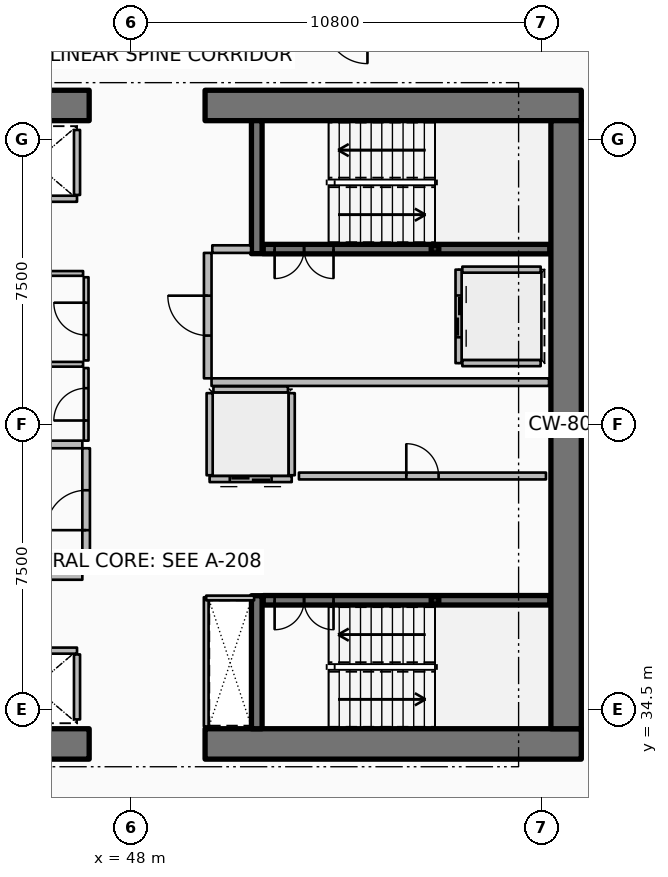
"""IFC4 building model, lengths in metres.
Left out: names, types, materials, properties, quantities, classifications, styles, units other than length and angle.
Written with IfcOpenShell. Run it as: python <this file> out.ifc"""

import sys

from ifc_helpers import new_model, si_unit, direction, frame, frame_2d, origin, origin_2d, place, context, subcontext, project, spatial, rectangle, hollow_rectangle, extrude, element, fill, save


model = new_model("IFC4")
c1 = context("Model", 3, precision=1e-05, world=origin(), true_north=direction((0.0, 1.0)))
c2 = subcontext(c1, "Body", "Model", "MODEL_VIEW")
j1 = project(units=[si_unit("LENGTHUNIT", "METRE"), si_unit("PLANEANGLEUNIT", "RADIAN")], contexts=[c1])
p1 = place(None, origin())
s1 = spatial("IfcSite", under=j1, at=p1, CompositionType="ELEMENT")
p2 = place(p1, origin())
s2 = spatial("IfcBuilding", under=s1, at=p2, CompositionType="ELEMENT")
p3 = place(p2, frame((0.0, 0.0, 169.05)))
s3 = spatial("IfcBuildingStorey", under=s2, at=p3, CompositionType="ELEMENT", Elevation=169.05)
p4 = place(p3, frame((37.0, 33.6, 0.0), z_axis=(0.0, 0.0, 1.0), x_axis=(1.0, 0.0, 0.0)))
e1 = element("IfcWall", 1, at=p4, inside=s3, PredefinedType="SHEAR", context=c2, shape_type="SweptSolid", body=[
    extrude(rectangle(XDim=9.9, YDim=0.8, at=frame_2d((4.95, 0.0))), origin(), (0.0, 0.0, 1.0), 3.75),
])
p5 = place(p3, frame((49.95, 33.6, 0.0), z_axis=(0.0, 0.0, 1.0), x_axis=(1.0, 0.0, 0.0)))
e2 = element("IfcWall", 2, at=p5, inside=s3, PredefinedType="SHEAR", context=c2, shape_type="SweptSolid", body=[
    extrude(rectangle(XDim=9.9, YDim=0.8, at=frame_2d((4.95, 0.0))), origin(), (0.0, 0.0, 1.0), 3.75),
])
p6 = place(p3, frame((37.0, 50.4, 0.0), z_axis=(0.0, 0.0, 1.0), x_axis=(1.0, 0.0, 0.0)))
e3 = element("IfcWall", 3, at=p6, inside=s3, PredefinedType="SHEAR", context=c2, shape_type="SweptSolid", body=[
    extrude(rectangle(XDim=9.9, YDim=0.8, at=frame_2d((4.95, 0.0))), origin(), (0.0, 0.0, 1.0), 3.75),
])
p7 = place(p3, frame((49.95, 50.4, 0.0), z_axis=(0.0, 0.0, 1.0), x_axis=(1.0, 0.0, 0.0)))
e4 = element("IfcWall", 4, at=p7, inside=s3, PredefinedType="SHEAR", context=c2, shape_type="SweptSolid", body=[
    extrude(rectangle(XDim=9.9, YDim=0.8, at=frame_2d((4.95, 0.0))), origin(), (0.0, 0.0, 1.0), 3.75),
])
p8 = place(p3, frame((59.45, 34.0, 0.0), z_axis=(0.0, 0.0, 1.0), x_axis=(0.0, 1.0, 0.0)))
e5 = element("IfcWall", 5, at=p8, inside=s3, PredefinedType="SHEAR", context=c2, shape_type="SweptSolid", body=[
    extrude(rectangle(XDim=16.0, YDim=0.8, at=frame_2d((8.0, 0.0))), origin(), (0.0, 0.0, 1.0), 3.75),
])
for number, where, z_axis, x_axis in (
    (6, (51.31, 46.5, 0.0), (0.0, 0.0, 1.0), (0.0, 1.0, 0.0)),
    (7, (51.31, 34.0, 0.0), (0.0, 0.0, 1.0), (0.0, 1.0, 0.0)),
):
    element("IfcWall", number, at=place(p3, frame(where, z_axis=z_axis, x_axis=x_axis)), inside=s3, PredefinedType="SHEAR", context=c2, shape_type="SweptSolid", body=[
        extrude(rectangle(XDim=3.5, YDim=0.28, at=frame_2d((1.75, 0.0))), origin(), (0.0, 0.0, 1.0), 3.75),
    ])
for number, where, z_axis, x_axis in (
    (8, (56.0, 46.62, 0.0), (0.0, 0.0, 1.0), (1.0, 0.0, 0.0)),
    (9, (56.0, 37.38, 0.0), (0.0, 0.0, 1.0), (1.0, 0.0, 0.0)),
):
    element("IfcColumn", number, at=place(p3, frame(where, z_axis=z_axis, x_axis=x_axis)), inside=s3, PredefinedType="COLUMN", context=c2, shape_type="SweptSolid", body=[
        extrude(hollow_rectangle(XDim=0.2, YDim=0.2, WallThickness=0.01, InnerFilletRadius=0.01, OuterFilletRadius=0.02, at=origin_2d()), origin(), (0.0, 0.0, 1.0), 1.67),
    ])
p9 = place(p3, frame((51.48, 46.62, 0.0), z_axis=(0.0, 0.0, 1.0), x_axis=(1.0, 0.0, 0.0)))
e10 = element("IfcWall", 10, at=p9, inside=s3, PredefinedType="SOLIDWALL", context=c2, shape_type="SweptSolid", body=[
    extrude(rectangle(XDim=7.54, YDim=0.25, at=frame_2d((3.77, 0.0))), origin(), (0.0, 0.0, 1.0), 3.5),
])
p10 = place(p9, frame((0.3, 0.0, 0.0)))
e11 = element("IfcOpeningElement", 11, at=p10, cuts=e10, PredefinedType="OPENING", context=c2, shape_type="SweptSolid", body=[
    extrude(rectangle(XDim=1.55, YDim=2.15, at=frame_2d((0.775, 1.075))), frame((0.0, 0.135, 0.0), z_axis=(0.0, -1.0, 0.0), x_axis=(1.0, 0.0, 0.0)), (0.0, 0.0, 1.0), 0.27),
])
p11 = place(p3, frame((51.48, 37.38, 0.0), z_axis=(0.0, 0.0, 1.0), x_axis=(1.0, 0.0, 0.0)))
e12 = element("IfcWall", 12, at=p11, inside=s3, PredefinedType="SOLIDWALL", context=c2, shape_type="SweptSolid", body=[
    extrude(rectangle(XDim=7.54, YDim=0.25, at=frame_2d((3.77, 0.0))), origin(), (0.0, 0.0, 1.0), 3.5),
])
p12 = place(p11, frame((0.3, 0.0, 0.0)))
e13 = element("IfcOpeningElement", 13, at=p12, cuts=e12, PredefinedType="OPENING", context=c2, shape_type="SweptSolid", body=[
    extrude(rectangle(XDim=1.55, YDim=2.15, at=frame_2d((0.775, 1.075))), frame((0.0, 0.135, 0.0), z_axis=(0.0, -1.0, 0.0), x_axis=(1.0, 0.0, 0.0)), (0.0, 0.0, 1.0), 0.27),
])
p13 = place(p3, frame((46.58, 47.945, 0.0), z_axis=(0.0, 0.0, 1.0), x_axis=(-1.0, 0.0, 0.0)))
e14 = element("IfcWall", 14, at=p13, inside=s3, PredefinedType="PARTITIONING", context=c2, shape_type="SweptSolid", body=[
    extrude(rectangle(XDim=2.26, YDim=0.16, at=frame_2d((1.13, 0.0))), origin(), (0.0, 0.0, 1.0), 3.5),
])
p14 = place(p3, frame((46.58, 48.045, 0.0), z_axis=(0.0, 0.0, 1.0), x_axis=(0.0, 1.0, 0.0)))
e15 = element("IfcWall", 15, at=p14, inside=s3, PredefinedType="PARTITIONING", context=c2, shape_type="SweptSolid", body=[
    extrude(rectangle(XDim=1.71, YDim=0.16, at=frame_2d((0.855, 0.0))), origin(), (0.0, 0.0, 1.0), 3.5),
])
p15 = place(p3, frame((44.32, 36.055, 0.0), z_axis=(0.0, 0.0, 1.0), x_axis=(1.0, 0.0, 0.0)))
e16 = element("IfcWall", 16, at=p15, inside=s3, PredefinedType="PARTITIONING", context=c2, shape_type="SweptSolid", body=[
    extrude(rectangle(XDim=2.26, YDim=0.16, at=frame_2d((1.13, 0.0))), origin(), (0.0, 0.0, 1.0), 3.5),
])
p16 = place(p3, frame((46.58, 34.245, 0.0), z_axis=(0.0, 0.0, 1.0), x_axis=(0.0, 1.0, 0.0)))
e17 = element("IfcWall", 17, at=p16, inside=s3, PredefinedType="PARTITIONING", context=c2, shape_type="SweptSolid", body=[
    extrude(rectangle(XDim=1.71, YDim=0.16, at=frame_2d((0.855, 0.0))), origin(), (0.0, 0.0, 1.0), 3.5),
])
p17 = place(p3, frame((56.62, 46.08, 0.0), z_axis=(0.0, 0.0, 1.0), x_axis=(0.0, -1.0, 0.0)))
e18 = element("IfcWall", 18, at=p17, inside=s3, PredefinedType="PARTITIONING", context=c2, shape_type="SweptSolid", body=[
    extrude(rectangle(XDim=2.46, YDim=0.16, at=frame_2d((1.23, 0.0))), origin(), (0.0, 0.0, 1.0), 3.5),
])
p18 = place(p17, frame((0.68, 0.0, 0.0)))
e19 = element("IfcOpeningElement", 19, at=p18, cuts=e18, PredefinedType="OPENING", context=c2, shape_type="SweptSolid", body=[
    extrude(rectangle(XDim=1.1, YDim=2.1, at=frame_2d((0.55, 1.05))), frame((0.0, 0.09, 0.0), z_axis=(0.0, -1.0, 0.0), x_axis=(1.0, 0.0, 0.0)), (0.0, 0.0, 1.0), 0.18),
])
for number, where, z_axis, x_axis in (
    (20, (56.72, 46.08, 0.0), (0.0, 0.0, 1.0), (1.0, 0.0, 0.0)),
    (21, (56.72, 43.62, 0.0), (0.0, 0.0, 1.0), (1.0, 0.0, 0.0)),
):
    element("IfcWall", number, at=place(p3, frame(where, z_axis=z_axis, x_axis=x_axis)), inside=s3, PredefinedType="PARTITIONING", context=c2, shape_type="SweptSolid", body=[
        extrude(rectangle(XDim=2.06, YDim=0.16, at=frame_2d((1.03, 0.0))), origin(), (0.0, 0.0, 1.0), 3.5),
    ])
p19 = place(p3, frame((52.23, 40.57, 0.0), z_axis=(0.0, 0.0, 1.0), x_axis=(-1.0, 0.0, 0.0)))
e22 = element("IfcWall", 22, at=p19, inside=s3, PredefinedType="PARTITIONING", context=c2, shape_type="SweptSolid", body=[
    extrude(rectangle(XDim=2.16, YDim=0.16, at=frame_2d((1.08, 0.0))), origin(), (0.0, 0.0, 1.0), 3.5),
])
p20 = place(p19, frame((0.53, 0.0, 0.0)))
e23 = element("IfcOpeningElement", 23, at=p20, cuts=e22, PredefinedType="OPENING", context=c2, shape_type="SweptSolid", body=[
    extrude(rectangle(XDim=1.1, YDim=2.1, at=frame_2d((0.55, 1.05))), frame((0.0, 0.09, 0.0), z_axis=(0.0, -1.0, 0.0), x_axis=(1.0, 0.0, 0.0)), (0.0, 0.0, 1.0), 0.18),
])
for number, where, z_axis, x_axis in (
    (24, (52.23, 40.67, 0.0), (0.0, 0.0, 1.0), (0.0, 1.0, 0.0)),
    (25, (50.07, 40.67, 0.0), (0.0, 0.0, 1.0), (0.0, 1.0, 0.0)),
):
    element("IfcWall", number, at=place(p3, frame(where, z_axis=z_axis, x_axis=x_axis)), inside=s3, PredefinedType="PARTITIONING", context=c2, shape_type="SweptSolid", body=[
        extrude(rectangle(XDim=2.16, YDim=0.16, at=frame_2d((1.08, 0.0))), origin(), (0.0, 0.0, 1.0), 3.5),
    ])
p21 = place(p3, frame((50.17, 42.93, 0.0), z_axis=(0.0, 0.0, 1.0), x_axis=(1.0, 0.0, 0.0)))
e26 = element("IfcWall", 26, at=p21, inside=s3, PredefinedType="PARTITIONING", context=c2, shape_type="SweptSolid", body=[
    extrude(rectangle(XDim=1.96, YDim=0.16, at=frame_2d((0.98, 0.0))), origin(), (0.0, 0.0, 1.0), 3.5),
])
p22 = place(p3, frame((52.42, 40.65, 0.0), z_axis=(0.0, 0.0, 1.0), x_axis=(1.0, 0.0, 0.0)))
e27 = element("IfcWall", 27, at=p22, inside=s3, PredefinedType="PARTITIONING", context=c2, shape_type="SweptSolid", body=[
    extrude(rectangle(XDim=6.5, YDim=0.18, at=frame_2d((3.25, 0.0))), origin(), (0.0, 0.0, 1.0), 3.5),
])
p23 = place(p22, frame((2.825, 0.0, 0.0)))
e28 = element("IfcOpeningElement", 28, at=p23, cuts=e27, PredefinedType="OPENING", context=c2, shape_type="SweptSolid", body=[
    extrude(rectangle(XDim=0.85, YDim=2.06, at=frame_2d((0.425, 1.03))), frame((0.0, 0.1, 0.0), z_axis=(0.0, -1.0, 0.0), x_axis=(1.0, 0.0, 0.0)), (0.0, 0.0, 1.0), 0.2),
])
p24 = place(p3, frame((41.35, 38.02, 0.0), z_axis=(0.0, 0.0, 1.0), x_axis=(1.0, 0.0, 0.0)))
e29 = element("IfcWall", 29, at=p24, inside=s3, PredefinedType="PARTITIONING", context=c2, shape_type="SweptSolid", body=[
    extrude(rectangle(XDim=5.37, YDim=0.2, at=frame_2d((2.685, 0.0))), origin(), (0.0, 0.0, 1.0), 3.5),
])
p25 = place(p3, frame((43.92, 41.48, 0.0), z_axis=(0.0, 0.0, 1.0), x_axis=(1.0, 0.0, 0.0)))
e30 = element("IfcWall", 30, at=p25, inside=s3, PredefinedType="PARTITIONING", context=c2, shape_type="SweptSolid", body=[
    extrude(rectangle(XDim=2.8, YDim=0.2, at=frame_2d((1.4, 0.0))), origin(), (0.0, 0.0, 1.0), 3.5),
])
p26 = place(p3, frame((46.82, 38.12, 0.0), z_axis=(0.0, 0.0, 1.0), x_axis=(0.0, 1.0, 0.0)))
e31 = element("IfcWall", 31, at=p26, inside=s3, PredefinedType="PARTITIONING", context=c2, shape_type="SweptSolid", body=[
    extrude(rectangle(XDim=3.26, YDim=0.2, at=frame_2d((1.63, 0.0))), origin(), (0.0, 0.0, 1.0), 3.5),
])
p27 = place(p26, frame((1.105, 0.0, 0.0)))
e32 = element("IfcOpeningElement", 32, at=p27, cuts=e31, PredefinedType="OPENING", context=c2, shape_type="SweptSolid", body=[
    extrude(rectangle(XDim=1.05, YDim=2.1, at=frame_2d((0.525, 1.05))), frame((0.0, 0.11, 0.0), z_axis=(0.0, -1.0, 0.0), x_axis=(1.0, 0.0, 0.0)), (0.0, 0.0, 1.0), 0.22),
])
p28 = place(p3, frame((50.12, 43.12, 0.0), z_axis=(0.0, 0.0, 1.0), x_axis=(1.0, 0.0, 0.0)))
e33 = element("IfcWall", 33, at=p28, inside=s3, PredefinedType="PARTITIONING", context=c2, shape_type="SweptSolid", body=[
    extrude(rectangle(XDim=8.88, YDim=0.2, at=frame_2d((4.44, 0.0))), origin(), (0.0, 0.0, 1.0), 3.5),
])
p29 = place(p3, frame((50.14, 46.62, 0.0), z_axis=(0.0, 0.0, 1.0), x_axis=(1.0, 0.0, 0.0)))
e34 = element("IfcWall", 34, at=p29, inside=s3, PredefinedType="PARTITIONING", context=c2, shape_type="SweptSolid", body=[
    extrude(rectangle(XDim=1.02, YDim=0.2, at=frame_2d((0.51, 0.0))), origin(), (0.0, 0.0, 1.0), 3.5),
])
p30 = place(p3, frame((50.02, 43.22, 0.0), z_axis=(0.0, 0.0, 1.0), x_axis=(0.0, 1.0, 0.0)))
e35 = element("IfcWall", 35, at=p30, inside=s3, PredefinedType="PARTITIONING", context=c2, shape_type="SweptSolid", body=[
    extrude(rectangle(XDim=3.3, YDim=0.2, at=frame_2d((1.65, 0.0))), origin(), (0.0, 0.0, 1.0), 3.5),
])
p31 = place(p30, frame((1.125, 0.0, 0.0)))
e36 = element("IfcOpeningElement", 36, at=p31, cuts=e35, PredefinedType="OPENING", context=c2, shape_type="SweptSolid", body=[
    extrude(rectangle(XDim=1.05, YDim=2.1, at=frame_2d((0.525, 1.05))), frame((0.0, 0.11, 0.0), z_axis=(0.0, -1.0, 0.0), x_axis=(1.0, 0.0, 0.0)), (0.0, 0.0, 1.0), 0.22),
])
p32 = place(p3, frame((49.98, 34.06, 0.0), z_axis=(0.0, 0.0, 1.0), x_axis=(0.0, 1.0, 0.0)))
e37 = element("IfcWall", 37, at=p32, inside=s3, PredefinedType="PARTITIONING", context=c2, shape_type="SweptSolid", body=[
    extrude(rectangle(XDim=3.4, YDim=0.125, at=frame_2d((1.7, 0.0))), origin(), (0.0, 0.0, 1.0), 2.94),
])
p33 = place(p3, frame((49.98, 37.44, 0.0), z_axis=(0.0, 0.0, 1.0), x_axis=(1.0, 0.0, 0.0)))
e38 = element("IfcWall", 38, at=p33, inside=s3, PredefinedType="PARTITIONING", context=c2, shape_type="SweptSolid", body=[
    extrude(rectangle(XDim=1.26, YDim=0.125, at=frame_2d((0.63, 0.0))), origin(), (0.0, 0.0, 1.0), 2.94),
])
p34 = place(p3, frame((44.03, 43.59, 0.0), z_axis=(0.0, 0.0, 1.0), x_axis=(1.0, 0.0, 0.0)))
e39 = element("IfcWall", 39, at=p34, inside=s3, PredefinedType="PARTITIONING", context=c2, shape_type="SweptSolid", body=[
    extrude(rectangle(XDim=2.71, YDim=0.125, at=frame_2d((1.355, 0.0))), origin(), (0.0, 0.0, 1.0), 2.94),
])
p35 = place(p3, frame((46.82, 41.58, 0.0), z_axis=(0.0, 0.0, 1.0), x_axis=(0.0, 1.0, 0.0)))
e40 = element("IfcWall", 40, at=p35, inside=s3, PredefinedType="PARTITIONING", context=c2, shape_type="SweptSolid", body=[
    extrude(rectangle(XDim=1.91, YDim=0.125, at=frame_2d((0.955, 0.0))), origin(), (0.0, 0.0, 1.0), 2.94),
])
p36 = place(p35, frame((0.53, 0.0, 0.0)))
e41 = element("IfcOpeningElement", 41, at=p36, cuts=e40, PredefinedType="OPENING", context=c2, shape_type="SweptSolid", body=[
    extrude(rectangle(XDim=0.85, YDim=2.06, at=frame_2d((0.425, 1.03))), frame((0.0, 0.073, 0.0), z_axis=(0.0, -1.0, 0.0), x_axis=(1.0, 0.0, 0.0)), (0.0, 0.0, 1.0), 0.145),
])
p37 = place(p3, frame((46.82, 43.69, 0.0), z_axis=(0.0, 0.0, 1.0), x_axis=(0.0, 1.0, 0.0)))
e42 = element("IfcWall", 42, at=p37, inside=s3, PredefinedType="PARTITIONING", context=c2, shape_type="SweptSolid", body=[
    extrude(rectangle(XDim=2.19, YDim=0.125, at=frame_2d((1.095, 0.0))), origin(), (0.0, 0.0, 1.0), 2.94),
])
p38 = place(p37, frame((0.67, 0.0, 0.0)))
e43 = element("IfcOpeningElement", 43, at=p38, cuts=e42, PredefinedType="OPENING", context=c2, shape_type="SweptSolid", body=[
    extrude(rectangle(XDim=0.85, YDim=2.06, at=frame_2d((0.425, 1.03))), frame((0.0, 0.073, 0.0), z_axis=(0.0, -1.0, 0.0), x_axis=(1.0, 0.0, 0.0)), (0.0, 0.0, 1.0), 0.145),
])
p39 = place(p3, frame((45.48, 45.98, 0.0), z_axis=(0.0, 0.0, 1.0), x_axis=(1.0, 0.0, 0.0)))
e44 = element("IfcWall", 44, at=p39, inside=s3, PredefinedType="PARTITIONING", context=c2, shape_type="SweptSolid", body=[
    extrude(rectangle(XDim=1.26, YDim=0.125, at=frame_2d((0.63, 0.0))), origin(), (0.0, 0.0, 1.0), 2.94),
])
p40 = place(p3, frame((63.52, 50.815, 0.0), z_axis=(0.0, 0.0, 1.0), x_axis=(-0.649447526186, 0.760406411553, 0.0)))
e45 = element("IfcWall", 45, at=p40, inside=s3, PredefinedType="PARTITIONING", context=c2, shape_type="SweptSolid", body=[
    extrude(rectangle(XDim=6.753, YDim=0.125, at=frame_2d((3.376, 0.0))), origin(), (0.0, 0.0, 1.0), 2.94),
])
p41 = place(p40, frame((2.926, 0.0, 0.0)))
e46 = element("IfcOpeningElement", 46, at=p41, cuts=e45, PredefinedType="OPENING", context=c2, shape_type="SweptSolid", body=[
    extrude(rectangle(XDim=0.9, YDim=2.08, at=frame_2d((0.45, 1.04))), frame((0.0, 0.073, 0.0), z_axis=(0.0, -1.0, 0.0), x_axis=(1.0, 0.0, 0.0)), (0.0, 0.0, 1.0), 0.145),
])
p42 = place(p10, origin())
e47 = element("IfcDoor", 47, at=p42, inside=s3, OperationType="DOUBLE_DOOR_SINGLE_SWING", PredefinedType="DOOR", context=c2, shape_type="SweptSolid", body=[
    extrude(rectangle(XDim=1.55, YDim=2.15, at=frame_2d((0.775, 1.075))), frame((0.0, 0.025, 0.0), z_axis=(0.0, -1.0, 0.0), x_axis=(1.0, 0.0, 0.0)), (0.0, 0.0, 1.0), 0.05),
])
fill(e11, e47)
p43 = place(p12, origin())
e48 = element("IfcDoor", 48, at=p43, inside=s3, OperationType="DOUBLE_DOOR_SINGLE_SWING", PredefinedType="DOOR", context=c2, shape_type="SweptSolid", body=[
    extrude(rectangle(XDim=1.55, YDim=2.15, at=frame_2d((0.775, 1.075))), frame((0.0, 0.025, 0.0), z_axis=(0.0, -1.0, 0.0), x_axis=(1.0, 0.0, 0.0)), (0.0, 0.0, 1.0), 0.05),
])
fill(e13, e48)
p44 = place(p18, origin())
e49 = element("IfcDoor", 49, at=p44, inside=s3, OperationType="DOUBLE_DOOR_SLIDING", PredefinedType="DOOR", context=c2, shape_type="SweptSolid", body=[
    extrude(rectangle(XDim=1.1, YDim=2.1, at=frame_2d((0.55, 1.05))), frame((0.0, 0.025, 0.0), z_axis=(0.0, -1.0, 0.0), x_axis=(1.0, 0.0, 0.0)), (0.0, 0.0, 1.0), 0.05),
])
fill(e19, e49)
p45 = place(p20, origin())
e50 = element("IfcDoor", 50, at=p45, inside=s3, OperationType="DOUBLE_DOOR_SLIDING", PredefinedType="DOOR", context=c2, shape_type="SweptSolid", body=[
    extrude(rectangle(XDim=1.1, YDim=2.1, at=frame_2d((0.55, 1.05))), frame((0.0, 0.025, 0.0), z_axis=(0.0, -1.0, 0.0), x_axis=(1.0, 0.0, 0.0)), (0.0, 0.0, 1.0), 0.05),
])
fill(e23, e50)
p46 = place(p23, origin())
e51 = element("IfcDoor", 51, at=p46, inside=s3, OperationType="SINGLE_SWING_LEFT", PredefinedType="DOOR", context=c2, shape_type="SweptSolid", body=[
    extrude(rectangle(XDim=0.85, YDim=2.06, at=frame_2d((0.425, 1.03))), frame((0.0, 0.025, 0.0), z_axis=(0.0, -1.0, 0.0), x_axis=(1.0, 0.0, 0.0)), (0.0, 0.0, 1.0), 0.05),
])
fill(e28, e51)
p47 = place(p27, origin())
e52 = element("IfcDoor", 52, at=p47, inside=s3, OperationType="SINGLE_SWING_LEFT", PredefinedType="DOOR", context=c2, shape_type="SweptSolid", body=[
    extrude(rectangle(XDim=1.05, YDim=2.1, at=frame_2d((0.525, 1.05))), frame((0.0, 0.025, 0.0), z_axis=(0.0, -1.0, 0.0), x_axis=(1.0, 0.0, 0.0)), (0.0, 0.0, 1.0), 0.05),
])
fill(e32, e52)
p48 = place(p31, origin())
e53 = element("IfcDoor", 53, at=p48, inside=s3, OperationType="SINGLE_SWING_RIGHT", PredefinedType="DOOR", context=c2, shape_type="SweptSolid", body=[
    extrude(rectangle(XDim=1.05, YDim=2.1, at=frame_2d((0.525, 1.05))), frame((0.0, 0.025, 0.0), z_axis=(0.0, -1.0, 0.0), x_axis=(1.0, 0.0, 0.0)), (0.0, 0.0, 1.0), 0.05),
])
fill(e36, e53)
p49 = place(p36, origin())
e54 = element("IfcDoor", 54, at=p49, inside=s3, OperationType="SINGLE_SWING_LEFT", PredefinedType="DOOR", context=c2, shape_type="SweptSolid", body=[
    extrude(rectangle(XDim=0.85, YDim=2.06, at=frame_2d((0.425, 1.03))), frame((0.0, 0.025, 0.0), z_axis=(0.0, -1.0, 0.0), x_axis=(1.0, 0.0, 0.0)), (0.0, 0.0, 1.0), 0.05),
])
fill(e41, e54)
p50 = place(p38, origin())
e55 = element("IfcDoor", 55, at=p50, inside=s3, OperationType="SINGLE_SWING_RIGHT", PredefinedType="DOOR", context=c2, shape_type="SweptSolid", body=[
    extrude(rectangle(XDim=0.85, YDim=2.06, at=frame_2d((0.425, 1.03))), frame((0.0, 0.025, 0.0), z_axis=(0.0, -1.0, 0.0), x_axis=(1.0, 0.0, 0.0)), (0.0, 0.0, 1.0), 0.05),
])
fill(e43, e55)
save(model, sys.argv[1])
